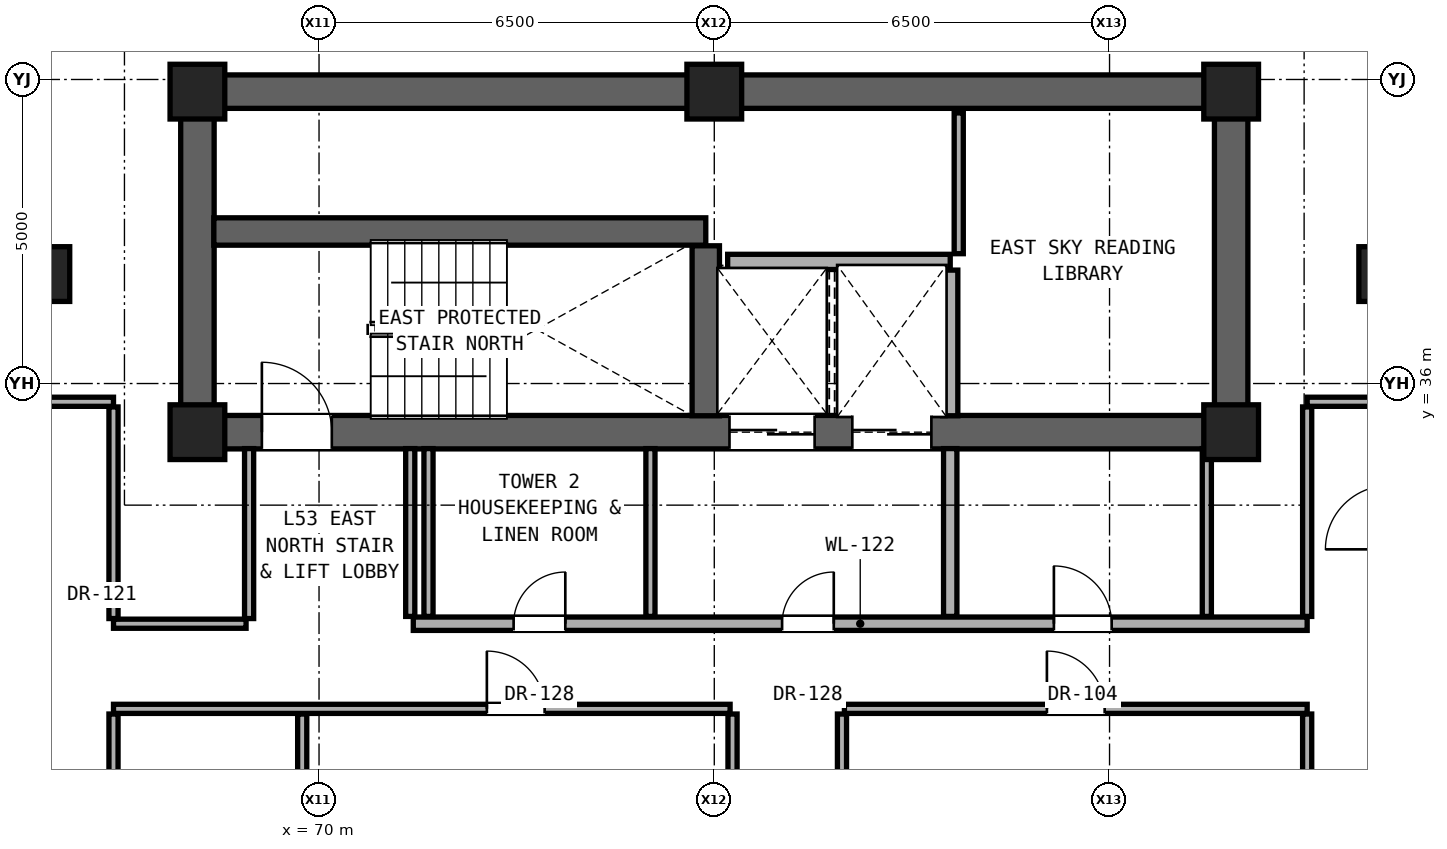
"""IFC4 building model, lengths in metres.
Left out: names, types, materials, properties, quantities, classifications, styles, units other than length and angle.
Written with IfcOpenShell. Run it as: python <this file> out.ifc"""

import sys

from ifc_helpers import new_model, si_unit, direction, frame, frame_2d, origin, origin_2d, place, context, subcontext, project, spatial, rectangle, extrude, element, fill, save


model = new_model("IFC4")
c1 = context("Model", 3, precision=1e-05, world=origin(), true_north=direction((0.0, 1.0)))
c2 = subcontext(c1, "Body", "Model", "MODEL_VIEW")
j1 = project(units=[si_unit("LENGTHUNIT", "METRE"), si_unit("PLANEANGLEUNIT", "RADIAN")], contexts=[c1])
p1 = place(None, origin())
s1 = spatial("IfcSite", under=j1, at=p1, CompositionType="ELEMENT")
p2 = place(p1, origin())
s2 = spatial("IfcBuilding", under=s1, at=p2, CompositionType="ELEMENT")
p3 = place(p2, frame((0.0, 0.0, 186.9)))
s3 = spatial("IfcBuildingStorey", under=s2, at=p3, CompositionType="ELEMENT", Elevation=186.9)
for number, where, z_axis, x_axis in (
    (1, (68.0, 35.2, 0.0), (0.0, 0.0, 1.0), (1.0, 0.0, 0.0)),
    (2, (85.0, 35.2, 0.0), (0.0, 0.0, 1.0), (1.0, 0.0, 0.0)),
    (3, (68.0, 40.8, 0.0), (0.0, 0.0, 1.0), (1.0, 0.0, 0.0)),
    (4, (76.5, 40.8, 0.0), (0.0, 0.0, 1.0), (1.0, 0.0, 0.0)),
    (5, (85.0, 40.8, 0.0), (0.0, 0.0, 1.0), (1.0, 0.0, 0.0)),
):
    element("IfcColumn", number, at=place(p3, frame(where, z_axis=z_axis, x_axis=x_axis)), inside=s3, PredefinedType="COLUMN", context=c2, shape_type="SweptSolid", body=[
        extrude(rectangle(XDim=0.9, YDim=0.9, at=origin_2d()), origin(), (0.0, 0.0, 1.0), 3.25),
    ])
for number, where, z_axis, x_axis in (
    (6, (65.6, 37.8, 0.0), (0.0, 0.0, 1.0), (1.0, 0.0, 0.0)),
    (7, (87.4, 37.8, 0.0), (0.0, 0.0, 1.0), (1.0, 0.0, 0.0)),
):
    element("IfcColumn", number, at=place(p3, frame(where, z_axis=z_axis, x_axis=x_axis)), inside=s3, PredefinedType="PILASTER", context=c2, shape_type="SweptSolid", body=[
        extrude(rectangle(XDim=0.6, YDim=0.9, at=origin_2d()), origin(), (0.0, 0.0, 1.0), 3.25),
    ])
p4 = place(p3, frame((68.0, 40.8, 0.0), z_axis=(0.0, 0.0, 1.0), x_axis=(1.0, 0.0, 0.0)))
e8 = element("IfcWall", 8, at=p4, inside=s3, PredefinedType="SHEAR", context=c2, shape_type="SweptSolid", body=[
    extrude(rectangle(XDim=17.0, YDim=0.55, at=frame_2d((8.5, 0.0))), origin(), (0.0, 0.0, 1.0), 3.05),
])
for number, where, z_axis, x_axis in (
    (9, (68.0, 35.2, 0.0), (0.0, 0.0, 1.0), (0.0, 1.0, 0.0)),
    (10, (85.0, 35.2, 0.0), (0.0, 0.0, 1.0), (0.0, 1.0, 0.0)),
):
    element("IfcWall", number, at=place(p3, frame(where, z_axis=z_axis, x_axis=x_axis)), inside=s3, PredefinedType="SHEAR", context=c2, shape_type="SweptSolid", body=[
        extrude(rectangle(XDim=5.6, YDim=0.55, at=frame_2d((2.8, 0.0))), origin(), (0.0, 0.0, 1.0), 3.05),
    ])
p5 = place(p3, frame((68.0, 35.2, 0.0), z_axis=(0.0, 0.0, 1.0), x_axis=(1.0, 0.0, 0.0)))
e11 = element("IfcWall", 11, at=p5, inside=s3, PredefinedType="SHEAR", context=c2, shape_type="SweptSolid", body=[
    extrude(rectangle(XDim=17.0, YDim=0.55, at=frame_2d((8.5, 0.0))), origin(), (0.0, 0.0, 1.0), 3.05),
])
p6 = place(p5, frame((1.06, 0.0, 0.0)))
e12 = element("IfcOpeningElement", 12, at=p6, cuts=e11, PredefinedType="OPENING", context=c2, shape_type="SweptSolid", body=[
    extrude(rectangle(XDim=1.15, YDim=2.2, at=frame_2d((0.575, 1.1))), frame((0.0, 0.285, 0.0), z_axis=(0.0, -1.0, 0.0), x_axis=(1.0, 0.0, 0.0)), (0.0, 0.0, 1.0), 0.57),
])
p7 = place(p5, frame((8.75, 0.0, 0.0)))
e13 = element("IfcOpeningElement", 13, at=p7, cuts=e11, PredefinedType="OPENING", context=c2, shape_type="SweptSolid", body=[
    extrude(rectangle(XDim=1.4, YDim=2.35, at=frame_2d((0.7, 1.175))), frame((0.0, 0.285, 0.0), z_axis=(0.0, -1.0, 0.0), x_axis=(1.0, 0.0, 0.0)), (0.0, 0.0, 1.0), 0.57),
])
p8 = place(p5, frame((10.77, 0.0, 0.0)))
e14 = element("IfcOpeningElement", 14, at=p8, cuts=e11, PredefinedType="OPENING", context=c2, shape_type="SweptSolid", body=[
    extrude(rectangle(XDim=1.3, YDim=2.3, at=frame_2d((0.65, 1.15))), frame((0.0, 0.285, 0.0), z_axis=(0.0, -1.0, 0.0), x_axis=(1.0, 0.0, 0.0)), (0.0, 0.0, 1.0), 0.57),
])
p9 = place(p3, frame((66.62, 30.65, 0.0), z_axis=(0.0, 0.0, 1.0), x_axis=(1.0, 0.0, 0.0)))
e15 = element("IfcWall", 15, at=p9, inside=s3, PredefinedType="PARTITIONING", context=c2, shape_type="SweptSolid", body=[
    extrude(rectangle(XDim=10.14, YDim=0.15, at=frame_2d((5.07, 0.0))), origin(), (0.0, 0.0, 1.0), 2.186),
])
p10 = place(p9, frame((6.14, 0.0, 0.0)))
e16 = element("IfcOpeningElement", 16, at=p10, cuts=e15, PredefinedType="OPENING", context=c2, shape_type="SweptSolid", body=[
    extrude(rectangle(XDim=0.95, YDim=2.15, at=frame_2d((0.475, 1.075))), frame((0.0, 0.085, 0.0), z_axis=(0.0, -1.0, 0.0), x_axis=(1.0, 0.0, 0.0)), (0.0, 0.0, 1.0), 0.17),
])
p11 = place(p3, frame((78.64, 30.65, 0.0), z_axis=(0.0, 0.0, 1.0), x_axis=(1.0, 0.0, 0.0)))
e17 = element("IfcWall", 17, at=p11, inside=s3, PredefinedType="PARTITIONING", context=c2, shape_type="SweptSolid", body=[
    extrude(rectangle(XDim=7.61, YDim=0.15, at=frame_2d((3.805, 0.0))), origin(), (0.0, 0.0, 1.0), 2.186),
])
p12 = place(p11, frame((3.33, 0.0, 0.0)))
e18 = element("IfcOpeningElement", 18, at=p12, cuts=e17, PredefinedType="OPENING", context=c2, shape_type="SweptSolid", body=[
    extrude(rectangle(XDim=0.95, YDim=2.15, at=frame_2d((0.475, 1.075))), frame((0.0, 0.085, 0.0), z_axis=(0.0, -1.0, 0.0), x_axis=(1.0, 0.0, 0.0)), (0.0, 0.0, 1.0), 0.17),
])
p13 = place(p3, frame((66.62, 32.05, 0.0), z_axis=(0.0, 0.0, 1.0), x_axis=(1.0, 0.0, 0.0)))
e19 = element("IfcWall", 19, at=p13, inside=s3, PredefinedType="PARTITIONING", context=c2, shape_type="SweptSolid", body=[
    extrude(rectangle(XDim=2.18, YDim=0.15, at=frame_2d((1.09, 0.0))), origin(), (0.0, 0.0, 1.0), 2.186),
])
p14 = place(p3, frame((71.55, 32.05, 0.0), z_axis=(0.0, 0.0, 1.0), x_axis=(1.0, 0.0, 0.0)))
e20 = element("IfcWall", 20, at=p14, inside=s3, PredefinedType="SOLIDWALL", context=c2, shape_type="SweptSolid", body=[
    extrude(rectangle(XDim=14.7, YDim=0.22, at=frame_2d((7.35, 0.0))), origin(), (0.0, 0.0, 1.0), 2.186),
])
p15 = place(p14, frame((6.065, 0.0, 0.0)))
e21 = element("IfcOpeningElement", 21, at=p15, cuts=e20, PredefinedType="OPENING", context=c2, shape_type="SweptSolid", body=[
    extrude(rectangle(XDim=0.85, YDim=2.01, at=frame_2d((0.425, 1.005))), frame((0.0, 0.12, 0.0), z_axis=(0.0, -1.0, 0.0), x_axis=(1.0, 0.0, 0.0)), (0.0, 0.0, 1.0), 0.24),
])
p16 = place(p14, frame((10.535, 0.0, 0.0)))
e22 = element("IfcOpeningElement", 22, at=p16, cuts=e20, PredefinedType="OPENING", context=c2, shape_type="SweptSolid", body=[
    extrude(rectangle(XDim=0.95, YDim=2.15, at=frame_2d((0.475, 1.075))), frame((0.0, 0.12, 0.0), z_axis=(0.0, -1.0, 0.0), x_axis=(1.0, 0.0, 0.0)), (0.0, 0.0, 1.0), 0.24),
])
p17 = place(p14, frame((1.65, 0.0, 0.0)))
e23 = element("IfcOpeningElement", 23, at=p17, cuts=e20, PredefinedType="OPENING", context=c2, shape_type="SweptSolid", body=[
    extrude(rectangle(XDim=0.85, YDim=2.01, at=frame_2d((0.425, 1.005))), frame((0.0, 0.12, 0.0), z_axis=(0.0, -1.0, 0.0), x_axis=(1.0, 0.0, 0.0)), (0.0, 0.0, 1.0), 0.24),
])
p18 = place(p3, frame((65.25, 35.7, 0.0), z_axis=(0.0, 0.0, 1.0), x_axis=(1.0, 0.0, 0.0)))
e24 = element("IfcWall", 24, at=p18, inside=s3, PredefinedType="PARTITIONING", context=c2, shape_type="SweptSolid", body=[
    extrude(rectangle(XDim=1.37, YDim=0.15, at=frame_2d((0.685, 0.0))), origin(), (0.0, 0.0, 1.0), 3.05),
])
p19 = place(p3, frame((86.25, 35.7, 0.0), z_axis=(0.0, 0.0, 1.0), x_axis=(1.0, 0.0, 0.0)))
e25 = element("IfcWall", 25, at=p19, inside=s3, PredefinedType="PARTITIONING", context=c2, shape_type="SweptSolid", body=[
    extrude(rectangle(XDim=1.35, YDim=0.15, at=frame_2d((0.675, 0.0))), origin(), (0.0, 0.0, 1.0), 3.05),
])
p20 = place(p3, frame((76.72, 38.0, 0.0), z_axis=(0.0, 0.0, 1.0), x_axis=(1.0, 0.0, 0.0)))
e26 = element("IfcWall", 26, at=p20, inside=s3, PredefinedType="SOLIDWALL", context=c2, shape_type="SweptSolid", body=[
    extrude(rectangle(XDim=3.66, YDim=0.25, at=frame_2d((1.83, 0.0))), origin(), (0.0, 0.0, 1.0), 3.05),
])
p21 = place(p3, frame((68.27, 38.5, 0.0), z_axis=(0.0, 0.0, 1.0), x_axis=(1.0, 0.0, 0.0)))
e27 = element("IfcWall", 27, at=p21, inside=s3, PredefinedType="SHEAR", context=c2, shape_type="SweptSolid", body=[
    extrude(rectangle(XDim=8.09, YDim=0.45, at=frame_2d((4.045, 0.0))), origin(), (0.0, 0.0, 1.0), 3.05),
])
p22 = place(p3, frame((66.62, 24.935, 0.0), z_axis=(0.0, 0.0, 1.0), x_axis=(0.0, 1.0, 0.0)))
e28 = element("IfcWall", 28, at=p22, inside=s3, PredefinedType="PARTITIONING", context=c2, shape_type="SweptSolid", body=[
    extrude(rectangle(XDim=5.63, YDim=0.15, at=frame_2d((2.815, 0.0))), origin(), (0.0, 0.0, 1.0), 2.346),
])
p23 = place(p22, frame((2.34, 0.0, 0.0)))
e29 = element("IfcOpeningElement", 29, at=p23, cuts=e28, PredefinedType="OPENING", context=c2, shape_type="SweptSolid", body=[
    extrude(rectangle(XDim=0.95, YDim=2.15, at=frame_2d((0.475, 1.075))), frame((0.0, 0.085, 0.0), z_axis=(0.0, -1.0, 0.0), x_axis=(1.0, 0.0, 0.0)), (0.0, 0.0, 1.0), 0.17),
])
p24 = place(p3, frame((66.62, 32.135, 0.0), z_axis=(0.0, 0.0, 1.0), x_axis=(0.0, 1.0, 0.0)))
e30 = element("IfcWall", 30, at=p24, inside=s3, PredefinedType="PARTITIONING", context=c2, shape_type="SweptSolid", body=[
    extrude(rectangle(XDim=3.48, YDim=0.15, at=frame_2d((1.74, 0.0))), origin(), (0.0, 0.0, 1.0), 2.442),
])
p25 = place(p3, frame((68.85, 32.135, 0.0), z_axis=(0.0, 0.0, 1.0), x_axis=(0.0, 1.0, 0.0)))
e31 = element("IfcWall", 31, at=p25, inside=s3, PredefinedType="PARTITIONING", context=c2, shape_type="SweptSolid", body=[
    extrude(rectangle(XDim=2.795, YDim=0.15, at=frame_2d((1.397, 0.0))), origin(), (0.0, 0.0, 1.0), 3.05),
])
p26 = place(p3, frame((69.723, 24.935, 0.0), z_axis=(0.0, 0.0, 1.0), x_axis=(0.0, 1.0, 0.0)))
e32 = element("IfcWall", 32, at=p26, inside=s3, PredefinedType="PARTITIONING", context=c2, shape_type="SweptSolid", body=[
    extrude(rectangle(XDim=5.63, YDim=0.15, at=frame_2d((2.815, 0.0))), origin(), (0.0, 0.0, 1.0), 2.186),
])
for number, where, z_axis, x_axis in (
    (33, (71.5, 32.17, 0.0), (0.0, 0.0, 1.0), (0.0, 1.0, 0.0)),
    (34, (71.8, 32.17, 0.0), (0.0, 0.0, 1.0), (0.0, 1.0, 0.0)),
    (35, (75.45, 32.17, 0.0), (0.0, 0.0, 1.0), (0.0, 1.0, 0.0)),
):
    element("IfcWall", number, at=place(p3, frame(where, z_axis=z_axis, x_axis=x_axis)), inside=s3, PredefinedType="PARTITIONING", context=c2, shape_type="SweptSolid", body=[
        extrude(rectangle(XDim=2.76, YDim=0.15, at=frame_2d((1.38, 0.0))), origin(), (0.0, 0.0, 1.0), 3.05),
    ])
p27 = place(p3, frame((76.36, 35.47, 0.0), z_axis=(0.0, 0.0, 1.0), x_axis=(0.0, 1.0, 0.0)))
e36 = element("IfcWall", 36, at=p27, inside=s3, PredefinedType="SHEAR", context=c2, shape_type="SweptSolid", body=[
    extrude(rectangle(XDim=2.795, YDim=0.45, at=frame_2d((1.397, 0.0))), origin(), (0.0, 0.0, 1.0), 3.05),
])
p28 = place(p3, frame((76.8, 22.435, 0.0), z_axis=(0.0, 0.0, 1.0), x_axis=(0.0, 1.0, 0.0)))
e37 = element("IfcWall", 37, at=p28, inside=s3, PredefinedType="PARTITIONING", context=c2, shape_type="SweptSolid", body=[
    extrude(rectangle(XDim=8.13, YDim=0.15, at=frame_2d((4.065, 0.0))), origin(), (0.0, 0.0, 1.0), 2.186),
])
p29 = place(p3, frame((78.6, 27.485, 0.0), z_axis=(0.0, 0.0, 1.0), x_axis=(0.0, 1.0, 0.0)))
e38 = element("IfcWall", 38, at=p29, inside=s3, PredefinedType="PARTITIONING", context=c2, shape_type="SweptSolid", body=[
    extrude(rectangle(XDim=3.08, YDim=0.15, at=frame_2d((1.54, 0.0))), origin(), (0.0, 0.0, 1.0), 2.186),
])
p30 = place(p3, frame((80.38, 32.17, 0.0), z_axis=(0.0, 0.0, 1.0), x_axis=(0.0, 1.0, 0.0)))
e39 = element("IfcWall", 39, at=p30, inside=s3, PredefinedType="SOLIDWALL", context=c2, shape_type="SweptSolid", body=[
    extrude(rectangle(XDim=2.76, YDim=0.22, at=frame_2d((1.38, 0.0))), origin(), (0.0, 0.0, 1.0), 3.05),
])
p31 = place(p3, frame((80.38, 35.47, 0.0), z_axis=(0.0, 0.0, 1.0), x_axis=(0.0, 1.0, 0.0)))
e40 = element("IfcWall", 40, at=p31, inside=s3, PredefinedType="SOLIDWALL", context=c2, shape_type="SweptSolid", body=[
    extrude(rectangle(XDim=2.395, YDim=0.25, at=frame_2d((1.198, 0.0))), origin(), (0.0, 0.0, 1.0), 3.05),
])
p32 = place(p3, frame((80.52, 38.135, 0.0), z_axis=(0.0, 0.0, 1.0), x_axis=(0.0, 1.0, 0.0)))
e41 = element("IfcWall", 41, at=p32, inside=s3, PredefinedType="PARTITIONING", context=c2, shape_type="SweptSolid", body=[
    extrude(rectangle(XDim=2.315, YDim=0.15, at=frame_2d((1.157, 0.0))), origin(), (0.0, 0.0, 1.0), 3.05),
])
p33 = place(p3, frame((84.6, 32.17, 0.0), z_axis=(0.0, 0.0, 1.0), x_axis=(0.0, 1.0, 0.0)))
e42 = element("IfcWall", 42, at=p33, inside=s3, PredefinedType="PARTITIONING", context=c2, shape_type="SweptSolid", body=[
    extrude(rectangle(XDim=2.76, YDim=0.15, at=frame_2d((1.38, 0.0))), origin(), (0.0, 0.0, 1.0), 3.05),
])
p34 = place(p3, frame((86.25, 27.485, 0.0), z_axis=(0.0, 0.0, 1.0), x_axis=(0.0, 1.0, 0.0)))
e43 = element("IfcWall", 43, at=p34, inside=s3, PredefinedType="PARTITIONING", context=c2, shape_type="SweptSolid", body=[
    extrude(rectangle(XDim=3.08, YDim=0.15, at=frame_2d((1.54, 0.0))), origin(), (0.0, 0.0, 1.0), 2.346),
])
p35 = place(p3, frame((86.25, 32.17, 0.0), z_axis=(0.0, 0.0, 1.0), x_axis=(0.0, 1.0, 0.0)))
e44 = element("IfcWall", 44, at=p35, inside=s3, PredefinedType="PARTITIONING", context=c2, shape_type="SweptSolid", body=[
    extrude(rectangle(XDim=3.445, YDim=0.15, at=frame_2d((1.723, 0.0))), origin(), (0.0, 0.0, 1.0), 2.442),
])
p36 = place(p6, origin())
e45 = element("IfcDoor", 45, at=p36, inside=s3, OperationType="SINGLE_SWING_LEFT", PredefinedType="DOOR", context=c2, shape_type="SweptSolid", body=[
    extrude(rectangle(XDim=1.15, YDim=2.2, at=frame_2d((0.575, 1.1))), frame((0.0, 0.025, 0.0), z_axis=(0.0, -1.0, 0.0), x_axis=(1.0, 0.0, 0.0)), (0.0, 0.0, 1.0), 0.05),
])
fill(e12, e45)
p37 = place(p15, origin())
e46 = element("IfcDoor", 46, at=p37, inside=s3, OperationType="SINGLE_SWING_RIGHT", PredefinedType="DOOR", context=c2, shape_type="SweptSolid", body=[
    extrude(rectangle(XDim=0.85, YDim=2.01, at=frame_2d((0.425, 1.005))), frame((0.0, 0.025, 0.0), z_axis=(0.0, -1.0, 0.0), x_axis=(1.0, 0.0, 0.0)), (0.0, 0.0, 1.0), 0.05),
])
fill(e21, e46)
p38 = place(p16, origin())
e47 = element("IfcDoor", 47, at=p38, inside=s3, OperationType="SINGLE_SWING_LEFT", PredefinedType="DOOR", context=c2, shape_type="SweptSolid", body=[
    extrude(rectangle(XDim=0.95, YDim=2.15, at=frame_2d((0.475, 1.075))), frame((0.0, 0.025, 0.0), z_axis=(0.0, -1.0, 0.0), x_axis=(1.0, 0.0, 0.0)), (0.0, 0.0, 1.0), 0.05),
])
fill(e22, e47)
p39 = place(p17, origin())
e48 = element("IfcDoor", 48, at=p39, inside=s3, OperationType="SINGLE_SWING_RIGHT", PredefinedType="DOOR", context=c2, shape_type="SweptSolid", body=[
    extrude(rectangle(XDim=0.85, YDim=2.01, at=frame_2d((0.425, 1.005))), frame((0.0, 0.025, 0.0), z_axis=(0.0, -1.0, 0.0), x_axis=(1.0, 0.0, 0.0)), (0.0, 0.0, 1.0), 0.05),
])
fill(e23, e48)
p40 = place(p10, origin())
e49 = element("IfcDoor", 49, at=p40, inside=s3, OperationType="SINGLE_SWING_LEFT", PredefinedType="DOOR", context=c2, shape_type="SweptSolid", body=[
    extrude(rectangle(XDim=0.95, YDim=2.15, at=frame_2d((0.475, 1.075))), frame((0.0, 0.025, 0.0), z_axis=(0.0, -1.0, 0.0), x_axis=(1.0, 0.0, 0.0)), (0.0, 0.0, 1.0), 0.05),
])
fill(e16, e49)
p41 = place(p12, origin())
e50 = element("IfcDoor", 50, at=p41, inside=s3, OperationType="SINGLE_SWING_LEFT", PredefinedType="DOOR", context=c2, shape_type="SweptSolid", body=[
    extrude(rectangle(XDim=0.95, YDim=2.15, at=frame_2d((0.475, 1.075))), frame((0.0, 0.025, 0.0), z_axis=(0.0, -1.0, 0.0), x_axis=(1.0, 0.0, 0.0)), (0.0, 0.0, 1.0), 0.05),
])
fill(e18, e50)
p42 = place(p7, origin())
e51 = element("IfcDoor", 51, at=p42, inside=s3, OperationType="DOUBLE_DOOR_SLIDING", PredefinedType="DOOR", context=c2, shape_type="SweptSolid", body=[
    extrude(rectangle(XDim=1.4, YDim=2.35, at=frame_2d((0.7, 1.175))), frame((0.0, 0.025, 0.0), z_axis=(0.0, -1.0, 0.0), x_axis=(1.0, 0.0, 0.0)), (0.0, 0.0, 1.0), 0.05),
])
fill(e13, e51)
p43 = place(p8, origin())
e52 = element("IfcDoor", 52, at=p43, inside=s3, OperationType="DOUBLE_DOOR_SLIDING", PredefinedType="DOOR", context=c2, shape_type="SweptSolid", body=[
    extrude(rectangle(XDim=1.3, YDim=2.3, at=frame_2d((0.65, 1.15))), frame((0.0, 0.025, 0.0), z_axis=(0.0, -1.0, 0.0), x_axis=(1.0, 0.0, 0.0)), (0.0, 0.0, 1.0), 0.05),
])
fill(e14, e52)
save(model, sys.argv[1])
